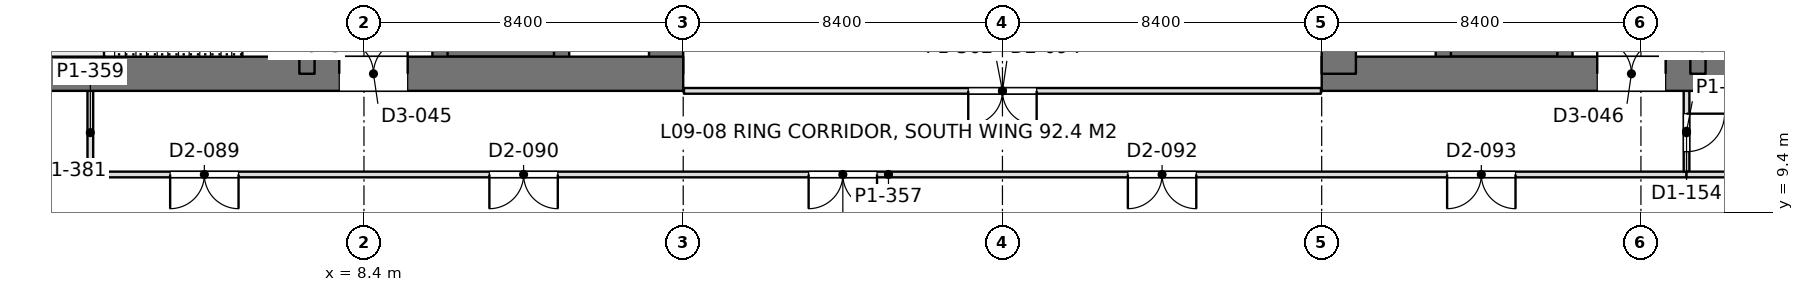
"""IFC4 building model, lengths in metres.
Left out: names, types, materials, properties, quantities, classifications, styles, units other than length and angle.
Written with IfcOpenShell. Run it as: python <this file> out.ifc"""

import sys

from ifc_helpers import new_model, si_unit, direction, frame, frame_2d, origin, place, context, subcontext, project, spatial, rectangle, extrude, element, fill, save


model = new_model("IFC4")
c1 = context("Model", 3, precision=1e-05, world=origin(), true_north=direction((0.0, 1.0)))
c2 = subcontext(c1, "Body", "Model", "MODEL_VIEW")
j1 = project(units=[si_unit("LENGTHUNIT", "METRE"), si_unit("PLANEANGLEUNIT", "RADIAN")], contexts=[c1])
p1 = place(None, origin())
s1 = spatial("IfcSite", under=j1, at=p1, CompositionType="ELEMENT")
p2 = place(p1, origin())
s2 = spatial("IfcBuilding", under=s1, at=p2, CompositionType="ELEMENT")
p3 = place(p2, frame((0.0, 0.0, 41.4)))
s3 = spatial("IfcBuildingStorey", under=s2, at=p3, CompositionType="ELEMENT", Elevation=41.4)
p4 = place(p3, frame((-1.2, 13.05, 0.0), z_axis=(0.0, 0.0, 1.0), x_axis=(1.0, 0.0, 0.0)))
e1 = element("IfcWall", 1, at=p4, inside=s3, PredefinedType="SHEAR", context=c2, shape_type="SweptSolid", body=[
    extrude(rectangle(XDim=18.0, YDim=0.9, at=frame_2d((9.0, 0.0))), origin(), (0.0, 0.0, 1.0), 4.5),
])
p5 = place(p4, frame((8.95, 0.0, 0.0)))
e2 = element("IfcOpeningElement", 2, at=p5, cuts=e1, PredefinedType="OPENING", context=c2, shape_type="SweptSolid", body=[
    extrude(rectangle(XDim=1.8, YDim=2.4, at=frame_2d((0.9, 1.2))), frame((0.0, 0.46, 0.0), z_axis=(0.0, -1.0, 0.0), x_axis=(1.0, 0.0, 0.0)), (0.0, 0.0, 1.0), 0.92),
])
p6 = place(p3, frame((16.35, 13.05, 0.0), z_axis=(0.0, 0.0, 1.0), x_axis=(0.0, 1.0, 0.0)))
e3 = element("IfcWall", 3, at=p6, inside=s3, PredefinedType="SHEAR", context=c2, shape_type="SweptSolid", body=[
    extrude(rectangle(XDim=24.3, YDim=0.9, at=frame_2d((12.15, 0.0))), origin(), (0.0, 0.0, 1.0), 4.5),
])
p7 = place(p3, frame((6.9, 13.05, 0.0), z_axis=(0.0, 0.0, 1.0), x_axis=(0.0, 1.0, 0.0)))
e4 = element("IfcWall", 4, at=p7, inside=s3, PredefinedType="SHEAR", context=c2, shape_type="SweptSolid", body=[
    extrude(rectangle(XDim=24.3, YDim=0.4, at=frame_2d((12.15, 0.0))), origin(), (0.0, 0.0, 1.0), 4.5),
])
p8 = place(p7, frame((1.3, 0.0, 0.0)))
e5 = element("IfcOpeningElement", 5, at=p8, cuts=e4, PredefinedType="OPENING", context=c2, shape_type="SweptSolid", body=[
    extrude(rectangle(XDim=1.0, YDim=2.2, at=frame_2d((0.5, 1.1))), frame((0.0, 0.21, 0.0), z_axis=(0.0, -1.0, 0.0), x_axis=(1.0, 0.0, 0.0)), (0.0, 0.0, 1.0), 0.42),
])
p9 = place(p7, frame((22.0, 0.0, 0.0)))
e6 = element("IfcOpeningElement", 6, at=p9, cuts=e4, PredefinedType="OPENING", context=c2, shape_type="SweptSolid", body=[
    extrude(rectangle(XDim=1.0, YDim=2.2, at=frame_2d((0.5, 1.1))), frame((0.0, 0.21, 0.0), z_axis=(0.0, -1.0, 0.0), x_axis=(1.0, 0.0, 0.0)), (0.0, 0.0, 1.0), 0.42),
])
p10 = place(p7, frame((5.55, 0.0, 0.0)))
e7 = element("IfcOpeningElement", 7, at=p10, cuts=e4, PredefinedType="OPENING", context=c2, shape_type="SweptSolid", body=[
    extrude(rectangle(XDim=1.0, YDim=2.2, at=frame_2d((0.5, 1.1))), frame((0.0, 0.21, 0.0), z_axis=(0.0, -1.0, 0.0), x_axis=(1.0, 0.0, 0.0)), (0.0, 0.0, 1.0), 0.42),
])
p11 = place(p7, frame((9.55, 0.0, 0.0)))
e8 = element("IfcOpeningElement", 8, at=p11, cuts=e4, PredefinedType="OPENING", context=c2, shape_type="SweptSolid", body=[
    extrude(rectangle(XDim=1.0, YDim=2.2, at=frame_2d((0.5, 1.1))), frame((0.0, 0.21, 0.0), z_axis=(0.0, -1.0, 0.0), x_axis=(1.0, 0.0, 0.0)), (0.0, 0.0, 1.0), 0.42),
])
p12 = place(p7, frame((12.8, 0.0, 0.0)))
e9 = element("IfcOpeningElement", 9, at=p12, cuts=e4, PredefinedType="OPENING", context=c2, shape_type="SweptSolid", body=[
    extrude(rectangle(XDim=1.1, YDim=2.2, at=frame_2d((0.55, 1.1))), frame((0.0, 0.21, 0.0), z_axis=(0.0, -1.0, 0.0), x_axis=(1.0, 0.0, 0.0)), (0.0, 0.0, 1.0), 0.42),
])
p13 = place(p7, frame((15.538, 0.0, 0.0)))
e10 = element("IfcOpeningElement", 10, at=p13, cuts=e4, PredefinedType="OPENING", context=c2, shape_type="SweptSolid", body=[
    extrude(rectangle(XDim=1.1, YDim=2.2, at=frame_2d((0.55, 1.1))), frame((0.0, 0.21, 0.0), z_axis=(0.0, -1.0, 0.0), x_axis=(1.0, 0.0, 0.0)), (0.0, 0.0, 1.0), 0.42),
])
p14 = place(p7, frame((18.262, 0.0, 0.0)))
e11 = element("IfcOpeningElement", 11, at=p14, cuts=e4, PredefinedType="OPENING", context=c2, shape_type="SweptSolid", body=[
    extrude(rectangle(XDim=1.1, YDim=2.2, at=frame_2d((0.55, 1.1))), frame((0.0, 0.21, 0.0), z_axis=(0.0, -1.0, 0.0), x_axis=(1.0, 0.0, 0.0)), (0.0, 0.0, 1.0), 0.42),
])
p15 = place(p3, frame((10.4, 13.05, 0.0), z_axis=(0.0, 0.0, 1.0), x_axis=(0.0, 1.0, 0.0)))
e12 = element("IfcWall", 12, at=p15, inside=s3, PredefinedType="SHEAR", context=c2, shape_type="SweptSolid", body=[
    extrude(rectangle(XDim=24.3, YDim=0.4, at=frame_2d((12.15, 0.0))), origin(), (0.0, 0.0, 1.0), 4.5),
])
p16 = place(p15, frame((1.5, 0.0, 0.0)))
e13 = element("IfcOpeningElement", 13, at=p16, cuts=e12, PredefinedType="OPENING", context=c2, shape_type="SweptSolid", body=[
    extrude(rectangle(XDim=1.1, YDim=2.2, at=frame_2d((0.55, 1.1))), frame((0.0, 0.21, 0.0), z_axis=(0.0, -1.0, 0.0), x_axis=(1.0, 0.0, 0.0)), (0.0, 0.0, 1.0), 0.42),
])
p17 = place(p15, frame((4.35, 0.0, 0.0)))
e14 = element("IfcOpeningElement", 14, at=p17, cuts=e12, PredefinedType="OPENING", context=c2, shape_type="SweptSolid", body=[
    extrude(rectangle(XDim=1.1, YDim=2.2, at=frame_2d((0.55, 1.1))), frame((0.0, 0.21, 0.0), z_axis=(0.0, -1.0, 0.0), x_axis=(1.0, 0.0, 0.0)), (0.0, 0.0, 1.0), 0.42),
])
p18 = place(p15, frame((7.2, 0.0, 0.0)))
e15 = element("IfcOpeningElement", 15, at=p18, cuts=e12, PredefinedType="OPENING", context=c2, shape_type="SweptSolid", body=[
    extrude(rectangle(XDim=1.1, YDim=2.2, at=frame_2d((0.55, 1.1))), frame((0.0, 0.21, 0.0), z_axis=(0.0, -1.0, 0.0), x_axis=(1.0, 0.0, 0.0)), (0.0, 0.0, 1.0), 0.42),
])
p19 = place(p15, frame((21.45, 0.0, 0.0)))
e16 = element("IfcOpeningElement", 16, at=p19, cuts=e12, PredefinedType="OPENING", context=c2, shape_type="SweptSolid", body=[
    extrude(rectangle(XDim=1.1, YDim=2.2, at=frame_2d((0.55, 1.1))), frame((0.0, 0.21, 0.0), z_axis=(0.0, -1.0, 0.0), x_axis=(1.0, 0.0, 0.0)), (0.0, 0.0, 1.0), 0.42),
])
p20 = place(p3, frame((13.6, 13.05, 0.0), z_axis=(0.0, 0.0, 1.0), x_axis=(0.0, 1.0, 0.0)))
e17 = element("IfcWall", 17, at=p20, inside=s3, PredefinedType="SHEAR", context=c2, shape_type="SweptSolid", body=[
    extrude(rectangle(XDim=24.3, YDim=0.4, at=frame_2d((12.15, 0.0))), origin(), (0.0, 0.0, 1.0), 4.5),
])
p21 = place(p3, frame((10.4, 13.65, 0.0), z_axis=(0.0, 0.0, 1.0), x_axis=(1.0, 0.0, 0.0)))
e18 = element("IfcWall", 18, at=p21, inside=s3, PredefinedType="SHEAR", context=c2, shape_type="SweptSolid", body=[
    extrude(rectangle(XDim=3.2, YDim=0.3, at=frame_2d((1.6, 0.0))), origin(), (0.0, 0.0, 1.0), 4.5),
])
p22 = place(p3, frame((33.6, 13.05, 0.0), z_axis=(0.0, 0.0, 1.0), x_axis=(1.0, 0.0, 0.0)))
e19 = element("IfcWall", 19, at=p22, inside=s3, PredefinedType="SHEAR", context=c2, shape_type="SweptSolid", body=[
    extrude(rectangle(XDim=18.0, YDim=0.9, at=frame_2d((9.0, 0.0))), origin(), (0.0, 0.0, 1.0), 4.5),
])
p23 = place(p22, frame((7.25, 0.0, 0.0)))
e20 = element("IfcOpeningElement", 20, at=p23, cuts=e19, PredefinedType="OPENING", context=c2, shape_type="SweptSolid", body=[
    extrude(rectangle(XDim=1.8, YDim=2.4, at=frame_2d((0.9, 1.2))), frame((0.0, 0.46, 0.0), z_axis=(0.0, -1.0, 0.0), x_axis=(1.0, 0.0, 0.0)), (0.0, 0.0, 1.0), 0.92),
])
p24 = place(p3, frame((34.05, 13.05, 0.0), z_axis=(0.0, 0.0, 1.0), x_axis=(0.0, 1.0, 0.0)))
e21 = element("IfcWall", 21, at=p24, inside=s3, PredefinedType="SHEAR", context=c2, shape_type="SweptSolid", body=[
    extrude(rectangle(XDim=24.3, YDim=0.9, at=frame_2d((12.15, 0.0))), origin(), (0.0, 0.0, 1.0), 4.5),
])
p25 = place(p3, frame((43.5, 13.05, 0.0), z_axis=(0.0, 0.0, 1.0), x_axis=(0.0, 1.0, 0.0)))
e22 = element("IfcWall", 22, at=p25, inside=s3, PredefinedType="SHEAR", context=c2, shape_type="SweptSolid", body=[
    extrude(rectangle(XDim=24.3, YDim=0.4, at=frame_2d((12.15, 0.0))), origin(), (0.0, 0.0, 1.0), 4.5),
])
p26 = place(p25, frame((1.3, 0.0, 0.0)))
e23 = element("IfcOpeningElement", 23, at=p26, cuts=e22, PredefinedType="OPENING", context=c2, shape_type="SweptSolid", body=[
    extrude(rectangle(XDim=1.0, YDim=2.2, at=frame_2d((0.5, 1.1))), frame((0.0, 0.21, 0.0), z_axis=(0.0, -1.0, 0.0), x_axis=(1.0, 0.0, 0.0)), (0.0, 0.0, 1.0), 0.42),
])
p27 = place(p25, frame((22.0, 0.0, 0.0)))
e24 = element("IfcOpeningElement", 24, at=p27, cuts=e22, PredefinedType="OPENING", context=c2, shape_type="SweptSolid", body=[
    extrude(rectangle(XDim=1.0, YDim=2.2, at=frame_2d((0.5, 1.1))), frame((0.0, 0.21, 0.0), z_axis=(0.0, -1.0, 0.0), x_axis=(1.0, 0.0, 0.0)), (0.0, 0.0, 1.0), 0.42),
])
p28 = place(p25, frame((5.55, 0.0, 0.0)))
e25 = element("IfcOpeningElement", 25, at=p28, cuts=e22, PredefinedType="OPENING", context=c2, shape_type="SweptSolid", body=[
    extrude(rectangle(XDim=1.0, YDim=2.2, at=frame_2d((0.5, 1.1))), frame((0.0, 0.21, 0.0), z_axis=(0.0, -1.0, 0.0), x_axis=(1.0, 0.0, 0.0)), (0.0, 0.0, 1.0), 0.42),
])
p29 = place(p25, frame((9.55, 0.0, 0.0)))
e26 = element("IfcOpeningElement", 26, at=p29, cuts=e22, PredefinedType="OPENING", context=c2, shape_type="SweptSolid", body=[
    extrude(rectangle(XDim=1.0, YDim=2.2, at=frame_2d((0.5, 1.1))), frame((0.0, 0.21, 0.0), z_axis=(0.0, -1.0, 0.0), x_axis=(1.0, 0.0, 0.0)), (0.0, 0.0, 1.0), 0.42),
])
p30 = place(p25, frame((12.8, 0.0, 0.0)))
e27 = element("IfcOpeningElement", 27, at=p30, cuts=e22, PredefinedType="OPENING", context=c2, shape_type="SweptSolid", body=[
    extrude(rectangle(XDim=1.1, YDim=2.2, at=frame_2d((0.55, 1.1))), frame((0.0, 0.21, 0.0), z_axis=(0.0, -1.0, 0.0), x_axis=(1.0, 0.0, 0.0)), (0.0, 0.0, 1.0), 0.42),
])
p31 = place(p25, frame((15.538, 0.0, 0.0)))
e28 = element("IfcOpeningElement", 28, at=p31, cuts=e22, PredefinedType="OPENING", context=c2, shape_type="SweptSolid", body=[
    extrude(rectangle(XDim=1.1, YDim=2.2, at=frame_2d((0.55, 1.1))), frame((0.0, 0.21, 0.0), z_axis=(0.0, -1.0, 0.0), x_axis=(1.0, 0.0, 0.0)), (0.0, 0.0, 1.0), 0.42),
])
p32 = place(p25, frame((18.262, 0.0, 0.0)))
e29 = element("IfcOpeningElement", 29, at=p32, cuts=e22, PredefinedType="OPENING", context=c2, shape_type="SweptSolid", body=[
    extrude(rectangle(XDim=1.1, YDim=2.2, at=frame_2d((0.55, 1.1))), frame((0.0, 0.21, 0.0), z_axis=(0.0, -1.0, 0.0), x_axis=(1.0, 0.0, 0.0)), (0.0, 0.0, 1.0), 0.42),
])
p33 = place(p3, frame((40.0, 13.05, 0.0), z_axis=(0.0, 0.0, 1.0), x_axis=(0.0, 1.0, 0.0)))
e30 = element("IfcWall", 30, at=p33, inside=s3, PredefinedType="SHEAR", context=c2, shape_type="SweptSolid", body=[
    extrude(rectangle(XDim=24.3, YDim=0.4, at=frame_2d((12.15, 0.0))), origin(), (0.0, 0.0, 1.0), 4.5),
])
p34 = place(p33, frame((1.5, 0.0, 0.0)))
e31 = element("IfcOpeningElement", 31, at=p34, cuts=e30, PredefinedType="OPENING", context=c2, shape_type="SweptSolid", body=[
    extrude(rectangle(XDim=1.1, YDim=2.2, at=frame_2d((0.55, 1.1))), frame((0.0, 0.21, 0.0), z_axis=(0.0, -1.0, 0.0), x_axis=(1.0, 0.0, 0.0)), (0.0, 0.0, 1.0), 0.42),
])
p35 = place(p33, frame((4.35, 0.0, 0.0)))
e32 = element("IfcOpeningElement", 32, at=p35, cuts=e30, PredefinedType="OPENING", context=c2, shape_type="SweptSolid", body=[
    extrude(rectangle(XDim=1.1, YDim=2.2, at=frame_2d((0.55, 1.1))), frame((0.0, 0.21, 0.0), z_axis=(0.0, -1.0, 0.0), x_axis=(1.0, 0.0, 0.0)), (0.0, 0.0, 1.0), 0.42),
])
p36 = place(p33, frame((7.2, 0.0, 0.0)))
e33 = element("IfcOpeningElement", 33, at=p36, cuts=e30, PredefinedType="OPENING", context=c2, shape_type="SweptSolid", body=[
    extrude(rectangle(XDim=1.1, YDim=2.2, at=frame_2d((0.55, 1.1))), frame((0.0, 0.21, 0.0), z_axis=(0.0, -1.0, 0.0), x_axis=(1.0, 0.0, 0.0)), (0.0, 0.0, 1.0), 0.42),
])
p37 = place(p33, frame((21.45, 0.0, 0.0)))
e34 = element("IfcOpeningElement", 34, at=p37, cuts=e30, PredefinedType="OPENING", context=c2, shape_type="SweptSolid", body=[
    extrude(rectangle(XDim=1.1, YDim=2.2, at=frame_2d((0.55, 1.1))), frame((0.0, 0.21, 0.0), z_axis=(0.0, -1.0, 0.0), x_axis=(1.0, 0.0, 0.0)), (0.0, 0.0, 1.0), 0.42),
])
p38 = place(p3, frame((36.8, 13.05, 0.0), z_axis=(0.0, 0.0, 1.0), x_axis=(0.0, 1.0, 0.0)))
e35 = element("IfcWall", 35, at=p38, inside=s3, PredefinedType="SHEAR", context=c2, shape_type="SweptSolid", body=[
    extrude(rectangle(XDim=24.3, YDim=0.4, at=frame_2d((12.15, 0.0))), origin(), (0.0, 0.0, 1.0), 4.5),
])
p39 = place(p3, frame((40.0, 13.65, 0.0), z_axis=(0.0, 0.0, 1.0), x_axis=(-1.0, 0.0, 0.0)))
e36 = element("IfcWall", 36, at=p39, inside=s3, PredefinedType="SHEAR", context=c2, shape_type="SweptSolid", body=[
    extrude(rectangle(XDim=3.2, YDim=0.3, at=frame_2d((1.6, 0.0))), origin(), (0.0, 0.0, 1.0), 4.5),
])
p40 = place(p3, frame((1.2, 10.4, 0.0), z_axis=(0.0, 0.0, 1.0), x_axis=(1.0, 0.0, 0.0)))
e37 = element("IfcWall", 37, at=p40, inside=s3, PredefinedType="PARTITIONING", context=c2, shape_type="SweptSolid", body=[
    extrude(rectangle(XDim=42.002, YDim=0.15, at=frame_2d((21.001, 0.0))), origin(), (0.0, 0.0, 1.0), 3.74),
])
p41 = place(p40, frame((2.1, 0.0, 0.0)))
e38 = element("IfcOpeningElement", 38, at=p41, cuts=e37, PredefinedType="OPENING", context=c2, shape_type="SweptSolid", body=[
    extrude(rectangle(XDim=1.8, YDim=2.2, at=frame_2d((0.9, 1.1))), frame((0.0, 0.085, 0.0), z_axis=(0.0, -1.0, 0.0), x_axis=(1.0, 0.0, 0.0)), (0.0, 0.0, 1.0), 0.17),
])
p42 = place(p40, frame((10.5, 0.0, 0.0)))
e39 = element("IfcOpeningElement", 39, at=p42, cuts=e37, PredefinedType="OPENING", context=c2, shape_type="SweptSolid", body=[
    extrude(rectangle(XDim=1.8, YDim=2.2, at=frame_2d((0.9, 1.1))), frame((0.0, 0.085, 0.0), z_axis=(0.0, -1.0, 0.0), x_axis=(1.0, 0.0, 0.0)), (0.0, 0.0, 1.0), 0.17),
])
p43 = place(p40, frame((18.9, 0.0, 0.0)))
e40 = element("IfcOpeningElement", 40, at=p43, cuts=e37, PredefinedType="OPENING", context=c2, shape_type="SweptSolid", body=[
    extrude(rectangle(XDim=1.8, YDim=2.2, at=frame_2d((0.9, 1.1))), frame((0.0, 0.085, 0.0), z_axis=(0.0, -1.0, 0.0), x_axis=(1.0, 0.0, 0.0)), (0.0, 0.0, 1.0), 0.17),
])
p44 = place(p40, frame((27.3, 0.0, 0.0)))
e41 = element("IfcOpeningElement", 41, at=p44, cuts=e37, PredefinedType="OPENING", context=c2, shape_type="SweptSolid", body=[
    extrude(rectangle(XDim=1.8, YDim=2.2, at=frame_2d((0.9, 1.1))), frame((0.0, 0.085, 0.0), z_axis=(0.0, -1.0, 0.0), x_axis=(1.0, 0.0, 0.0)), (0.0, 0.0, 1.0), 0.17),
])
p45 = place(p40, frame((35.7, 0.0, 0.0)))
e42 = element("IfcOpeningElement", 42, at=p45, cuts=e37, PredefinedType="OPENING", context=c2, shape_type="SweptSolid", body=[
    extrude(rectangle(XDim=1.8, YDim=2.2, at=frame_2d((0.9, 1.1))), frame((0.0, 0.085, 0.0), z_axis=(0.0, -1.0, 0.0), x_axis=(1.0, 0.0, 0.0)), (0.0, 0.0, 1.0), 0.17),
])
p46 = place(p3, frame((1.2, 10.4, 0.0), z_axis=(0.0, 0.0, 1.0), x_axis=(0.0, 1.0, 0.0)))
e43 = element("IfcWall", 43, at=p46, inside=s3, PredefinedType="PARTITIONING", context=c2, shape_type="SweptSolid", body=[
    extrude(rectangle(XDim=2.202, YDim=0.15, at=frame_2d((1.101, 0.0))), origin(), (0.0, 0.0, 1.0), 4.34),
])
p47 = place(p3, frame((43.2, 10.474, 0.0), z_axis=(0.0, 0.0, 1.0), x_axis=(0.0, 1.0, 0.0)))
e44 = element("IfcWall", 44, at=p47, inside=s3, PredefinedType="PARTITIONING", context=c2, shape_type="SweptSolid", body=[
    extrude(rectangle(XDim=2.128, YDim=0.15, at=frame_2d((1.064, 0.0))), origin(), (0.0, 0.0, 1.0), 4.34),
])
p48 = place(p47, frame((0.526, 0.0, 0.0)))
e45 = element("IfcOpeningElement", 45, at=p48, cuts=e44, PredefinedType="OPENING", context=c2, shape_type="SweptSolid", body=[
    extrude(rectangle(XDim=1.0, YDim=2.2, at=frame_2d((0.5, 1.1))), frame((0.0, 0.085, 0.0), z_axis=(0.0, -1.0, 0.0), x_axis=(1.0, 0.0, 0.0)), (0.0, 0.0, 1.0), 0.17),
])
p49 = place(p3, frame((43.198, 10.4, 0.0), z_axis=(0.0, 0.0, 1.0), x_axis=(1.0, 0.0, 0.0)))
e46 = element("IfcWall", 46, at=p49, inside=s3, PredefinedType="PARTITIONING", context=c2, shape_type="SweptSolid", body=[
    extrude(rectangle(XDim=6.002, YDim=0.15, at=frame_2d((3.001, 0.0))), origin(), (0.0, 0.0, 1.0), 4.34),
])
p50 = place(p3, frame((16.82, 12.6, 0.0), z_axis=(0.0, 0.0, 1.0), x_axis=(1.0, 0.0, 0.0)))
e47 = element("IfcWall", 47, at=p50, inside=s3, PredefinedType="PARTITIONING", context=c2, shape_type="SweptSolid", body=[
    extrude(rectangle(XDim=16.76, YDim=0.15, at=frame_2d((8.38, 0.0))), origin(), (0.0, 0.0, 1.0), 3.74),
])
p51 = place(p50, frame((7.48, 0.0, 0.0)))
e48 = element("IfcOpeningElement", 48, at=p51, cuts=e47, PredefinedType="OPENING", context=c2, shape_type="SweptSolid", body=[
    extrude(rectangle(XDim=1.8, YDim=2.2, at=frame_2d((0.9, 1.1))), frame((0.0, 0.085, 0.0), z_axis=(0.0, -1.0, 0.0), x_axis=(1.0, 0.0, 0.0)), (0.0, 0.0, 1.0), 0.17),
])
p52 = place(p5, origin())
e49 = element("IfcDoor", 49, at=p52, inside=s3, OperationType="DOUBLE_DOOR_SINGLE_SWING", PredefinedType="DOOR", context=c2, shape_type="SweptSolid", body=[
    extrude(rectangle(XDim=1.8, YDim=2.4, at=frame_2d((0.9, 1.2))), frame((0.0, 0.025, 0.0), z_axis=(0.0, -1.0, 0.0), x_axis=(1.0, 0.0, 0.0)), (0.0, 0.0, 1.0), 0.05),
])
fill(e2, e49)
p53 = place(p23, origin())
e50 = element("IfcDoor", 50, at=p53, inside=s3, OperationType="DOUBLE_DOOR_SINGLE_SWING", PredefinedType="DOOR", context=c2, shape_type="SweptSolid", body=[
    extrude(rectangle(XDim=1.8, YDim=2.4, at=frame_2d((0.9, 1.2))), frame((0.0, 0.025, 0.0), z_axis=(0.0, -1.0, 0.0), x_axis=(1.0, 0.0, 0.0)), (0.0, 0.0, 1.0), 0.05),
])
fill(e20, e50)
p54 = place(p41, frame((1.8, 0.0, 0.0), z_axis=(0.0, 0.0, 1.0), x_axis=(-1.0, 0.0, 0.0)))
e51 = element("IfcDoor", 51, at=p54, inside=s3, OperationType="DOUBLE_DOOR_SINGLE_SWING", PredefinedType="DOOR", context=c2, shape_type="SweptSolid", body=[
    extrude(rectangle(XDim=1.8, YDim=2.2, at=frame_2d((0.9, 1.1))), frame((0.0, 0.025, 0.0), z_axis=(0.0, -1.0, 0.0), x_axis=(1.0, 0.0, 0.0)), (0.0, 0.0, 1.0), 0.05),
])
fill(e38, e51)
p55 = place(p42, frame((1.8, 0.0, 0.0), z_axis=(0.0, 0.0, 1.0), x_axis=(-1.0, 0.0, 0.0)))
e52 = element("IfcDoor", 52, at=p55, inside=s3, OperationType="DOUBLE_DOOR_SINGLE_SWING", PredefinedType="DOOR", context=c2, shape_type="SweptSolid", body=[
    extrude(rectangle(XDim=1.8, YDim=2.2, at=frame_2d((0.9, 1.1))), frame((0.0, 0.025, 0.0), z_axis=(0.0, -1.0, 0.0), x_axis=(1.0, 0.0, 0.0)), (0.0, 0.0, 1.0), 0.05),
])
fill(e39, e52)
p56 = place(p43, frame((1.8, 0.0, 0.0), z_axis=(0.0, 0.0, 1.0), x_axis=(-1.0, 0.0, 0.0)))
e53 = element("IfcDoor", 53, at=p56, inside=s3, OperationType="DOUBLE_DOOR_SINGLE_SWING", PredefinedType="DOOR", context=c2, shape_type="SweptSolid", body=[
    extrude(rectangle(XDim=1.8, YDim=2.2, at=frame_2d((0.9, 1.1))), frame((0.0, 0.025, 0.0), z_axis=(0.0, -1.0, 0.0), x_axis=(1.0, 0.0, 0.0)), (0.0, 0.0, 1.0), 0.05),
])
fill(e40, e53)
p57 = place(p44, frame((1.8, 0.0, 0.0), z_axis=(0.0, 0.0, 1.0), x_axis=(-1.0, 0.0, 0.0)))
e54 = element("IfcDoor", 54, at=p57, inside=s3, OperationType="DOUBLE_DOOR_SINGLE_SWING", PredefinedType="DOOR", context=c2, shape_type="SweptSolid", body=[
    extrude(rectangle(XDim=1.8, YDim=2.2, at=frame_2d((0.9, 1.1))), frame((0.0, 0.025, 0.0), z_axis=(0.0, -1.0, 0.0), x_axis=(1.0, 0.0, 0.0)), (0.0, 0.0, 1.0), 0.05),
])
fill(e41, e54)
p58 = place(p45, frame((1.8, 0.0, 0.0), z_axis=(0.0, 0.0, 1.0), x_axis=(-1.0, 0.0, 0.0)))
e55 = element("IfcDoor", 55, at=p58, inside=s3, OperationType="DOUBLE_DOOR_SINGLE_SWING", PredefinedType="DOOR", context=c2, shape_type="SweptSolid", body=[
    extrude(rectangle(XDim=1.8, YDim=2.2, at=frame_2d((0.9, 1.1))), frame((0.0, 0.025, 0.0), z_axis=(0.0, -1.0, 0.0), x_axis=(1.0, 0.0, 0.0)), (0.0, 0.0, 1.0), 0.05),
])
fill(e42, e55)
p59 = place(p48, frame((1.0, 0.0, 0.0), z_axis=(0.0, 0.0, 1.0), x_axis=(-1.0, 0.0, 0.0)))
e56 = element("IfcDoor", 56, at=p59, inside=s3, OperationType="SINGLE_SWING_LEFT", PredefinedType="DOOR", context=c2, shape_type="SweptSolid", body=[
    extrude(rectangle(XDim=1.0, YDim=2.2, at=frame_2d((0.5, 1.1))), frame((0.0, 0.025, 0.0), z_axis=(0.0, -1.0, 0.0), x_axis=(1.0, 0.0, 0.0)), (0.0, 0.0, 1.0), 0.05),
])
fill(e45, e56)
p60 = place(p51, frame((1.8, 0.0, 0.0), z_axis=(0.0, 0.0, 1.0), x_axis=(-1.0, 0.0, 0.0)))
e57 = element("IfcDoor", 57, at=p60, inside=s3, OperationType="DOUBLE_DOOR_SINGLE_SWING", PredefinedType="DOOR", context=c2, shape_type="SweptSolid", body=[
    extrude(rectangle(XDim=1.8, YDim=2.2, at=frame_2d((0.9, 1.1))), frame((0.0, 0.025, 0.0), z_axis=(0.0, -1.0, 0.0), x_axis=(1.0, 0.0, 0.0)), (0.0, 0.0, 1.0), 0.05),
])
fill(e48, e57)
save(model, sys.argv[1])
